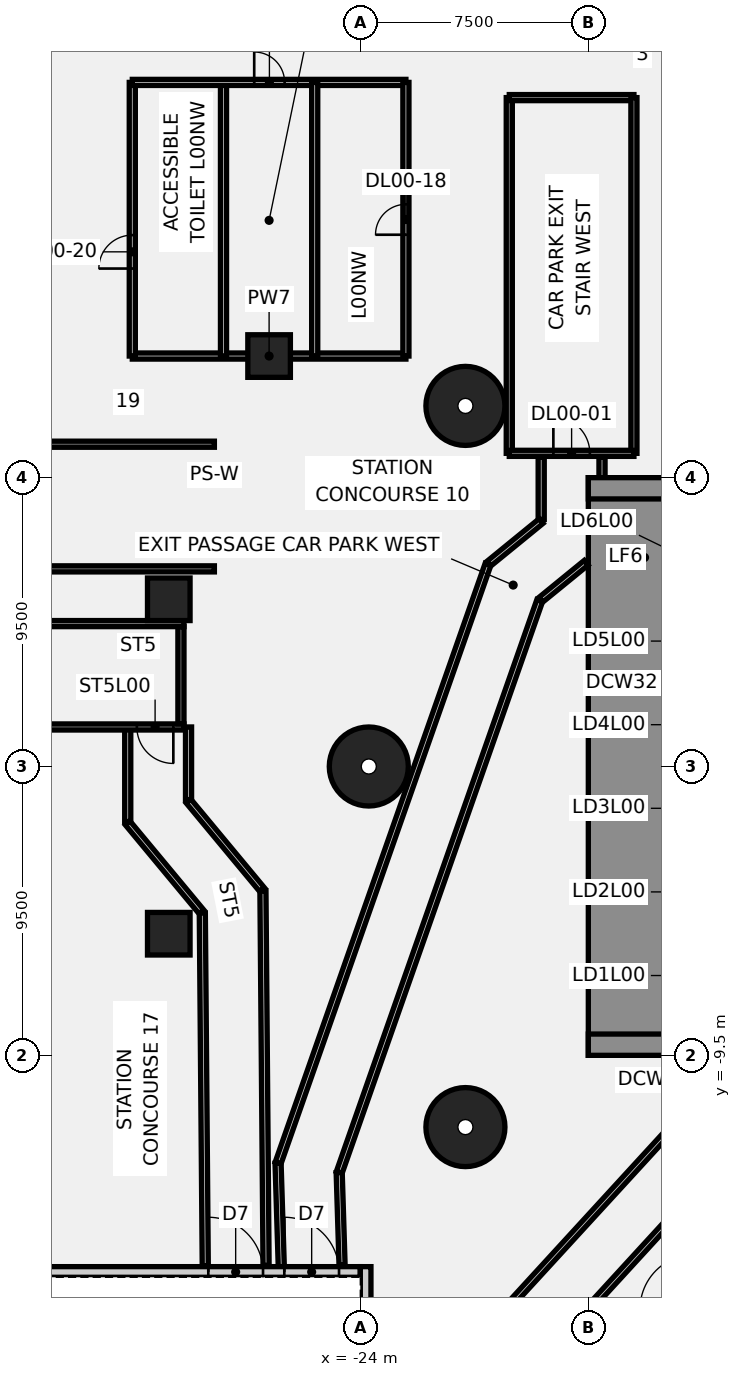
"""IFC4 building model, lengths in metres.
Left out: names, types, materials, properties, quantities, classifications, styles, units other than length and angle.
Written with IfcOpenShell. Run it as: python <this file> out.ifc"""

import sys

from ifc_helpers import new_model, si_unit, direction, frame, frame_2d, origin, origin_2d, place, context, subcontext, project, spatial, polyline, rectangle, circle, outline, extrude, element, fill, save


model = new_model("IFC4")
c1 = context("Model", 3, precision=1e-05, world=origin(), true_north=direction((0.0, 1.0)))
c2 = subcontext(c1, "Body", "Model", "MODEL_VIEW")
j1 = project(units=[si_unit("LENGTHUNIT", "METRE"), si_unit("PLANEANGLEUNIT", "RADIAN")], contexts=[c1])
p1 = place(None, origin())
s1 = spatial("IfcSite", under=j1, at=p1, CompositionType="ELEMENT")
p2 = place(p1, origin())
s2 = spatial("IfcBuilding", under=s1, at=p2, CompositionType="ELEMENT")
p3 = place(p2, origin())
s3 = spatial("IfcBuildingStorey", under=s2, at=p3, CompositionType="ELEMENT", Elevation=0.0)
for number, where, z_axis, x_axis in (
    (1, (-20.543, 11.86, -0.55), (0.0, 0.0, 1.0), (1.0, 0.0, 0.0)),
    (2, (-23.721, 0.0, -0.55), (0.0, 0.0, 1.0), (1.0, 0.0, 0.0)),
    (3, (-20.543, -11.86, -0.55), (0.0, 0.0, 1.0), (1.0, 0.0, 0.0)),
):
    element("IfcColumn", number, at=place(p3, frame(where, z_axis=z_axis, x_axis=x_axis)), inside=s3, PredefinedType="COLUMN", context=c2, shape_type="SweptSolid", body=[
        extrude(circle(Radius=1.3, at=origin_2d()), origin(), (0.0, 0.0, 1.0), 9.05),
    ])
for number, where, z_axis, x_axis in (
    (4, (-30.3, -5.5, -0.55), (0.0, 0.0, 1.0), (1.0, 0.0, 0.0)),
    (5, (-30.3, 5.5, -0.55), (0.0, 0.0, 1.0), (1.0, 0.0, 0.0)),
    (6, (-27.0, 13.5, -0.55), (0.0, 0.0, 1.0), (1.0, 0.0, 0.0)),
):
    element("IfcColumn", number, at=place(p3, frame(where, z_axis=z_axis, x_axis=x_axis)), inside=s3, PredefinedType="COLUMN", context=c2, shape_type="SweptSolid", body=[
        extrude(rectangle(XDim=1.4, YDim=1.4, at=origin_2d()), origin(), (0.0, 0.0, 1.0), 9.05),
    ])
p4 = place(p3, frame((-19.1, 10.3, 0.0), z_axis=(0.0, 0.0, 1.0), x_axis=(0.0, 1.0, 0.0)))
e7 = element("IfcWall", 7, at=p4, inside=s3, PredefinedType="PARTITIONING", context=c2, shape_type="SweptSolid", body=[
    extrude(rectangle(XDim=11.7, YDim=0.2, at=frame_2d((5.85, 0.0))), origin(), (0.0, 0.0, 1.0), 8.5),
])
p5 = place(p3, frame((-19.1, 22.0, 0.0), z_axis=(0.0, 0.0, 1.0), x_axis=(1.0, 0.0, 0.0)))
e8 = element("IfcWall", 8, at=p5, inside=s3, PredefinedType="PARTITIONING", context=c2, shape_type="SweptSolid", body=[
    extrude(rectangle(XDim=4.1, YDim=0.2, at=frame_2d((2.05, 0.0))), origin(), (0.0, 0.0, 1.0), 8.5),
])
p6 = place(p3, frame((-15.0, 10.3, 0.0), z_axis=(0.0, 0.0, 1.0), x_axis=(0.0, 1.0, 0.0)))
e9 = element("IfcWall", 9, at=p6, inside=s3, PredefinedType="PARTITIONING", context=c2, shape_type="SweptSolid", body=[
    extrude(rectangle(XDim=11.7, YDim=0.2, at=frame_2d((5.85, 0.0))), origin(), (0.0, 0.0, 1.0), 8.5),
])
p7 = place(p3, frame((-19.1, 10.3, 0.0), z_axis=(0.0, 0.0, 1.0), x_axis=(1.0, 0.0, 0.0)))
e10 = element("IfcWall", 10, at=p7, inside=s3, PredefinedType="PARTITIONING", context=c2, shape_type="SweptSolid", body=[
    extrude(rectangle(XDim=4.1, YDim=0.2, at=frame_2d((2.05, 0.0))), origin(), (0.0, 0.0, 1.0), 8.5),
])
p8 = place(p7, frame((1.45, 0.0, 0.0)))
e11 = element("IfcOpeningElement", 11, at=p8, cuts=e10, PredefinedType="OPENING", context=c2, shape_type="SweptSolid", body=[
    extrude(rectangle(XDim=1.2, YDim=2.1, at=frame_2d((0.6, 1.05))), frame((0.0, 0.11, 0.0), z_axis=(0.0, -1.0, 0.0), x_axis=(1.0, 0.0, 0.0)), (0.0, 0.0, 1.0), 0.22),
])
for number, where, z_axis, x_axis in (
    (12, (-31.5, 13.5, 0.0), (0.0, 0.0, 1.0), (1.0, 0.0, 0.0)),
    (13, (-28.5, 13.5, 0.0), (0.0, 0.0, 1.0), (0.0, 1.0, 0.0)),
):
    element("IfcWall", number, at=place(p3, frame(where, z_axis=z_axis, x_axis=x_axis)), inside=s3, PredefinedType="PARTITIONING", context=c2, shape_type="SweptSolid", body=[
        extrude(rectangle(XDim=9.0, YDim=0.2, at=frame_2d((4.5, 0.0))), origin(), (0.0, 0.0, 1.0), 8.5),
    ])
p9 = place(p3, frame((-31.5, 13.5, 0.0), z_axis=(0.0, 0.0, 1.0), x_axis=(0.0, 1.0, 0.0)))
e14 = element("IfcWall", 14, at=p9, inside=s3, PredefinedType="PARTITIONING", context=c2, shape_type="SweptSolid", body=[
    extrude(rectangle(XDim=9.0, YDim=0.2, at=frame_2d((4.5, 0.0))), origin(), (0.0, 0.0, 1.0), 8.5),
])
p10 = place(p9, frame((2.877, 0.0, 0.0)))
e15 = element("IfcOpeningElement", 15, at=p10, cuts=e14, PredefinedType="OPENING", context=c2, shape_type="SweptSolid", body=[
    extrude(rectangle(XDim=1.1, YDim=2.1, at=frame_2d((0.55, 1.05))), frame((0.0, 0.11, 0.0), z_axis=(0.0, -1.0, 0.0), x_axis=(1.0, 0.0, 0.0)), (0.0, 0.0, 1.0), 0.22),
])
p11 = place(p3, frame((-31.5, 22.5, 0.0), z_axis=(0.0, 0.0, 1.0), x_axis=(1.0, 0.0, 0.0)))
e16 = element("IfcWall", 16, at=p11, inside=s3, PredefinedType="PARTITIONING", context=c2, shape_type="SweptSolid", body=[
    extrude(rectangle(XDim=9.0, YDim=0.2, at=frame_2d((4.5, 0.0))), origin(), (0.0, 0.0, 1.0), 8.5),
])
p12 = place(p11, frame((4.01, 0.0, 0.0)))
e17 = element("IfcOpeningElement", 17, at=p12, cuts=e16, PredefinedType="OPENING", context=c2, shape_type="SweptSolid", body=[
    extrude(rectangle(XDim=1.0, YDim=2.1, at=frame_2d((0.5, 1.05))), frame((0.0, 0.11, 0.0), z_axis=(0.0, -1.0, 0.0), x_axis=(1.0, 0.0, 0.0)), (0.0, 0.0, 1.0), 0.22),
])
p13 = place(p3, frame((-22.5, 13.5, 0.0), z_axis=(0.0, 0.0, 1.0), x_axis=(0.0, 1.0, 0.0)))
e18 = element("IfcWall", 18, at=p13, inside=s3, PredefinedType="PARTITIONING", context=c2, shape_type="SweptSolid", body=[
    extrude(rectangle(XDim=9.0, YDim=0.2, at=frame_2d((4.5, 0.0))), origin(), (0.0, 0.0, 1.0), 8.5),
])
p14 = place(p13, frame((3.99, 0.0, 0.0)))
e19 = element("IfcOpeningElement", 19, at=p14, cuts=e18, PredefinedType="OPENING", context=c2, shape_type="SweptSolid", body=[
    extrude(rectangle(XDim=1.0, YDim=2.1, at=frame_2d((0.5, 1.05))), frame((0.0, 0.11, 0.0), z_axis=(0.0, -1.0, 0.0), x_axis=(1.0, 0.0, 0.0)), (0.0, 0.0, 1.0), 0.22),
])
p15 = place(p3, frame((-25.5, 13.5, 0.0), z_axis=(0.0, 0.0, 1.0), x_axis=(0.0, 1.0, 0.0)))
e20 = element("IfcWall", 20, at=p15, inside=s3, PredefinedType="PARTITIONING", context=c2, shape_type="SweptSolid", body=[
    extrude(rectangle(XDim=9.0, YDim=0.2, at=frame_2d((4.5, 0.0))), origin(), (0.0, 0.0, 1.0), 8.5),
])
p16 = place(p3, frame((-29.65, 1.3, 0.0), z_axis=(0.0, 0.0, 1.0), x_axis=(0.0, -1.0, 0.0)))
e21 = element("IfcWall", 21, at=p16, inside=s3, PredefinedType="PARTITIONING", context=c2, shape_type="SweptSolid", body=[
    extrude(rectangle(XDim=2.389, YDim=0.2, at=frame_2d((1.194, 0.0))), origin(), (0.0, 0.0, 1.0), 8.5),
])
p17 = place(p3, frame((-29.65, -1.139, 0.0), z_axis=(0.0, 0.0, 1.0), x_axis=(0.638893876697, -0.769294881251, 0.0)))
e22 = element("IfcWall", 22, at=p17, inside=s3, PredefinedType="PARTITIONING", context=c2, shape_type="SweptSolid", body=[
    extrude(rectangle(XDim=3.78, YDim=0.2, at=frame_2d((1.89, 0.0))), origin(), (0.0, 0.0, 1.0), 8.5),
])
p18 = place(p3, frame((-27.203, -4.085, 0.0), z_axis=(0.0, 0.0, 1.0), x_axis=(0.008338160089, -0.999965236939, 0.0)))
e23 = element("IfcWall", 23, at=p18, inside=s3, PredefinedType="PARTITIONING", context=c2, shape_type="SweptSolid", body=[
    extrude(rectangle(XDim=12.327, YDim=0.2, at=frame_2d((6.164, 0.0))), origin(), (0.0, 0.0, 1.0), 8.5),
])
p19 = place(p3, frame((-31.65, 1.3, 0.0), z_axis=(0.0, 0.0, 1.0), x_axis=(0.0, -1.0, 0.0)))
e24 = element("IfcWall", 24, at=p19, inside=s3, PredefinedType="PARTITIONING", context=c2, shape_type="SweptSolid", body=[
    extrude(rectangle(XDim=3.111, YDim=0.2, at=frame_2d((1.556, 0.0))), origin(), (0.0, 0.0, 1.0), 8.5),
])
p20 = place(p3, frame((-31.65, -1.861, 0.0), z_axis=(0.0, 0.0, 1.0), x_axis=(0.638890662578, -0.769297550543, 0.0)))
e25 = element("IfcWall", 25, at=p20, inside=s3, PredefinedType="PARTITIONING", context=c2, shape_type="SweptSolid", body=[
    extrude(rectangle(XDim=3.789, YDim=0.2, at=frame_2d((1.895, 0.0))), origin(), (0.0, 0.0, 1.0), 8.5),
])
p21 = place(p3, frame((-29.197, -4.815, 0.0), z_axis=(0.0, 0.0, 1.0), x_axis=(0.008345305348, -0.999965177333, 0.0)))
e26 = element("IfcWall", 26, at=p21, inside=s3, PredefinedType="PARTITIONING", context=c2, shape_type="SweptSolid", body=[
    extrude(rectangle(XDim=11.614, YDim=0.2, at=frame_2d((5.807, 0.0))), origin(), (0.0, 0.0, 1.0), 8.5),
])
p22 = place(p3, frame((-12.01, -12.95, 0.0), z_axis=(0.0, 0.0, 1.0), x_axis=(-0.675727545108, -0.737151466648, 0.0)))
e27 = element("IfcWall", 27, at=p22, inside=s3, PredefinedType="PARTITIONING", context=c2, shape_type="SweptSolid", body=[
    extrude(rectangle(XDim=11.372, YDim=0.2, at=frame_2d((5.686, 0.0))), origin(), (0.0, 0.0, 1.0), 8.5),
])
p23 = place(p3, frame((-12.89, -10.95, 0.0), z_axis=(0.0, 0.0, 1.0), x_axis=(-0.675720358886, -0.737158054007, 0.0)))
e28 = element("IfcWall", 28, at=p23, inside=s3, PredefinedType="PARTITIONING", context=c2, shape_type="SweptSolid", body=[
    extrude(rectangle(XDim=12.947, YDim=0.2, at=frame_2d((6.473, 0.0))), origin(), (0.0, 0.0, 1.0), 8.5),
])
p24 = place(p3, frame((-16.05, 10.18, 0.0), z_axis=(0.0, 0.0, 1.0), x_axis=(0.0, -1.0, 0.0)))
e29 = element("IfcWall", 29, at=p24, inside=s3, PredefinedType="PARTITIONING", context=c2, shape_type="SweptSolid", body=[
    extrude(rectangle(XDim=0.68, YDim=0.2, at=frame_2d((0.34, 0.0))), origin(), (0.0, 0.0, 1.0), 8.5),
])
p25 = place(p3, frame((-16.57, 6.701, 0.0), z_axis=(0.0, 0.0, 1.0), x_axis=(-0.774917348383, -0.632062578527, 0.0)))
e30 = element("IfcWall", 30, at=p25, inside=s3, PredefinedType="PARTITIONING", context=c2, shape_type="SweptSolid", body=[
    extrude(rectangle(XDim=1.924, YDim=0.2, at=frame_2d((0.962, 0.0))), origin(), (0.0, 0.0, 1.0), 8.5),
])
p26 = place(p3, frame((-18.1, 5.453, 0.0), z_axis=(0.0, 0.0, 1.0), x_axis=(-0.33089272618, -0.943668375946, 0.0)))
e31 = element("IfcWall", 31, at=p26, inside=s3, PredefinedType="PARTITIONING", context=c2, shape_type="SweptSolid", body=[
    extrude(rectangle(XDim=19.931, YDim=0.2, at=frame_2d((9.965, 0.0))), origin(), (0.0, 0.0, 1.0), 8.5),
])
p27 = place(p3, frame((-24.695, -13.355, 0.0), z_axis=(0.0, 0.0, 1.0), x_axis=(0.030966071292, -0.999520436224, 0.0)))
e32 = element("IfcWall", 32, at=p27, inside=s3, PredefinedType="PARTITIONING", context=c2, shape_type="SweptSolid", body=[
    extrude(rectangle(XDim=3.035, YDim=0.2, at=frame_2d((1.518, 0.0))), origin(), (0.0, 0.0, 1.0), 8.5),
])
p28 = place(p3, frame((-18.05, 10.18, 0.0), z_axis=(0.0, 0.0, 1.0), x_axis=(0.0, -1.0, 0.0)))
e33 = element("IfcWall", 33, at=p28, inside=s3, PredefinedType="PARTITIONING", context=c2, shape_type="SweptSolid", body=[
    extrude(rectangle(XDim=2.055, YDim=0.2, at=frame_2d((1.028, 0.0))), origin(), (0.0, 0.0, 1.0), 8.5),
])
p29 = place(p3, frame((-18.05, 8.075, 0.0), z_axis=(0.0, 0.0, 1.0), x_axis=(-0.774892088392, -0.632093546358, 0.0)))
e34 = element("IfcWall", 34, at=p29, inside=s3, PredefinedType="PARTITIONING", context=c2, shape_type="SweptSolid", body=[
    extrude(rectangle(XDim=2.209, YDim=0.2, at=frame_2d((1.104, 0.0))), origin(), (0.0, 0.0, 1.0), 8.5),
])
p30 = place(p3, frame((-19.8, 6.647, 0.0), z_axis=(0.0, 0.0, 1.0), x_axis=(-0.330903303789, -0.943664666893, 0.0)))
e35 = element("IfcWall", 35, at=p30, inside=s3, PredefinedType="PARTITIONING", context=c2, shape_type="SweptSolid", body=[
    extrude(rectangle(XDim=20.867, YDim=0.2, at=frame_2d((10.434, 0.0))), origin(), (0.0, 0.0, 1.0), 8.5),
])
p31 = place(p3, frame((-26.705, -13.045, 0.0), z_axis=(0.0, 0.0, 1.0), x_axis=(0.031031151855, -0.999518417847, 0.0)))
e36 = element("IfcWall", 36, at=p31, inside=s3, PredefinedType="PARTITIONING", context=c2, shape_type="SweptSolid", body=[
    extrude(rectangle(XDim=3.407, YDim=0.2, at=frame_2d((1.703, 0.0))), origin(), (0.0, 0.0, 1.0), 8.5),
])
for number, where, z_axis, x_axis in (
    (37, (-28.8, 10.6, 0.0), (0.0, 0.0, 1.0), (-1.0, 0.0, 0.0)),
    (38, (-28.8, 6.5, 0.0), (0.0, 0.0, 1.0), (-1.0, 0.0, 0.0)),
):
    element("IfcWall", number, at=place(p3, frame(where, z_axis=z_axis, x_axis=x_axis)), inside=s3, PredefinedType="SOLIDWALL", context=c2, shape_type="SweptSolid", body=[
        extrude(rectangle(XDim=9.7, YDim=0.2, at=frame_2d((4.85, 0.0))), origin(), (0.0, 0.0, 1.0), 8.5),
    ])
p32 = place(p3, frame((-42.0, -16.625, 0.0), z_axis=(0.0, 0.0, 1.0), x_axis=(1.0, 0.0, 0.0)))
e39 = element("IfcWall", 39, at=p32, inside=s3, PredefinedType="SOLIDWALL", context=c2, shape_type="SweptSolid", body=[
    extrude(rectangle(XDim=18.0, YDim=0.35, at=frame_2d((9.0, 0.0))), origin(), (0.0, 0.0, 1.0), 8.5),
])
p33 = place(p32, frame((13.0, 0.0, 0.0)))
e40 = element("IfcOpeningElement", 40, at=p33, cuts=e39, PredefinedType="OPENING", context=c2, shape_type="SweptSolid", body=[
    extrude(rectangle(XDim=1.8, YDim=2.4, at=frame_2d((0.9, 1.2))), frame((0.0, 0.185, 0.0), z_axis=(0.0, -1.0, 0.0), x_axis=(1.0, 0.0, 0.0)), (0.0, 0.0, 1.0), 0.37),
])
p34 = place(p32, frame((15.5, 0.0, 0.0)))
e41 = element("IfcOpeningElement", 41, at=p34, cuts=e39, PredefinedType="OPENING", context=c2, shape_type="SweptSolid", body=[
    extrude(rectangle(XDim=1.8, YDim=2.4, at=frame_2d((0.9, 1.2))), frame((0.0, 0.185, 0.0), z_axis=(0.0, -1.0, 0.0), x_axis=(1.0, 0.0, 0.0)), (0.0, 0.0, 1.0), 0.37),
])
p35 = place(p32, frame((4.05, 0.0, 1.0)))
e42 = element("IfcOpeningElement", 42, at=p35, cuts=e39, PredefinedType="OPENING", context=c2, shape_type="SweptSolid", body=[
    extrude(rectangle(XDim=2.4, YDim=1.8, at=frame_2d((1.2, 0.9))), frame((0.0, 0.185, 0.0), z_axis=(0.0, -1.0, 0.0), x_axis=(1.0, 0.0, 0.0)), (0.0, 0.0, 1.0), 0.37),
])
p36 = place(p3, frame((-23.825, -43.85, 0.0), z_axis=(0.0, 0.0, 1.0), x_axis=(0.0, 1.0, 0.0)))
e43 = element("IfcWall", 43, at=p36, inside=s3, PredefinedType="SOLIDWALL", context=c2, shape_type="SweptSolid", body=[
    extrude(rectangle(XDim=27.4, YDim=0.35, at=frame_2d((13.7, 0.0))), origin(), (0.0, 0.0, 1.0), 8.5),
])
p37 = place(p36, frame((20.35, 0.0, 0.0)))
e44 = element("IfcOpeningElement", 44, at=p37, cuts=e43, PredefinedType="OPENING", context=c2, shape_type="SweptSolid", body=[
    extrude(rectangle(XDim=1.8, YDim=2.4, at=frame_2d((0.9, 1.2))), frame((0.0, 0.185, 0.0), z_axis=(0.0, -1.0, 0.0), x_axis=(1.0, 0.0, 0.0)), (0.0, 0.0, 1.0), 0.37),
])
p38 = place(p36, frame((4.85, 0.0, 0.0)))
e45 = element("IfcOpeningElement", 45, at=p38, cuts=e43, PredefinedType="OPENING", context=c2, shape_type="SweptSolid", body=[
    extrude(rectangle(XDim=1.8, YDim=2.4, at=frame_2d((0.9, 1.2))), frame((0.0, 0.185, 0.0), z_axis=(0.0, -1.0, 0.0), x_axis=(1.0, 0.0, 0.0)), (0.0, 0.0, 1.0), 0.37),
])
p39 = place(p36, frame((14.9, 0.0, 1.0)))
e46 = element("IfcOpeningElement", 46, at=p39, cuts=e43, PredefinedType="OPENING", context=c2, shape_type="SweptSolid", body=[
    extrude(rectangle(XDim=2.4, YDim=1.8, at=frame_2d((1.2, 0.9))), frame((0.0, 0.185, 0.0), z_axis=(0.0, -1.0, 0.0), x_axis=(1.0, 0.0, 0.0)), (0.0, 0.0, 1.0), 0.37),
])
p40 = place(p3, frame((-16.5, -9.15, 0.0), z_axis=(0.0, 0.0, 1.0), x_axis=(1.0, 0.0, 0.0)))
e47 = element("IfcWall", 47, at=p40, inside=s3, PredefinedType="SHEAR", context=c2, shape_type="SweptSolid", body=[
    extrude(rectangle(XDim=13.0, YDim=0.7, at=frame_2d((6.5, 0.0))), origin(), (0.0, 0.0, 1.0), 8.5),
])
p41 = place(p40, frame((4.15, 0.0, 0.0)))
e48 = element("IfcOpeningElement", 48, at=p41, cuts=e47, PredefinedType="OPENING", context=c2, shape_type="SweptSolid", body=[
    extrude(rectangle(XDim=1.4, YDim=2.1, at=frame_2d((0.7, 1.05))), frame((0.0, 0.36, 0.0), z_axis=(0.0, -1.0, 0.0), x_axis=(1.0, 0.0, 0.0)), (0.0, 0.0, 1.0), 0.72),
])
p42 = place(p40, frame((10.125, 0.0, 0.0)))
e49 = element("IfcOpeningElement", 49, at=p42, cuts=e47, PredefinedType="OPENING", context=c2, shape_type="SweptSolid", body=[
    extrude(rectangle(XDim=1.4, YDim=2.1, at=frame_2d((0.7, 1.05))), frame((0.0, 0.36, 0.0), z_axis=(0.0, -1.0, 0.0), x_axis=(1.0, 0.0, 0.0)), (0.0, 0.0, 1.0), 0.72),
])
p43 = place(p3, frame((-16.5, 9.15, 0.0), z_axis=(0.0, 0.0, 1.0), x_axis=(1.0, 0.0, 0.0)))
e50 = element("IfcWall", 50, at=p43, inside=s3, PredefinedType="SHEAR", context=c2, shape_type="SweptSolid", body=[
    extrude(rectangle(XDim=13.0, YDim=0.7, at=frame_2d((6.5, 0.0))), origin(), (0.0, 0.0, 1.0), 8.5),
])
p44 = place(p43, frame((4.15, 0.0, 0.0)))
e51 = element("IfcOpeningElement", 51, at=p44, cuts=e50, PredefinedType="OPENING", context=c2, shape_type="SweptSolid", body=[
    extrude(rectangle(XDim=1.4, YDim=2.1, at=frame_2d((0.7, 1.05))), frame((0.0, 0.36, 0.0), z_axis=(0.0, -1.0, 0.0), x_axis=(1.0, 0.0, 0.0)), (0.0, 0.0, 1.0), 0.72),
])
p45 = place(p3, origin())
e52 = element("IfcWall", 52, at=p45, inside=s3, PredefinedType="SHEAR", context=c2, shape_type="SweptSolid", body=[
    extrude(outline(polyline([(-13.5, -8.8), (-13.5, -8.125), (-15.8, -8.125), (-15.8, -5.625), (-13.5, -5.625), (-13.5, -5.375), (-15.8, -5.375), (-15.8, -2.875), (-13.5, -2.875), (-13.5, -2.625), (-15.8, -2.625), (-15.8, -0.125), (-13.5, -0.125), (-13.5, 0.125), (-15.8, 0.125), (-15.8, 2.625), (-13.5, 2.625), (-13.5, 2.875), (-15.8, 2.875), (-15.8, 5.375), (-13.5, 5.375), (-13.5, 5.625), (-15.8, 5.625), (-15.8, 8.125), (-13.5, 8.125), (-13.5, 8.8), (-15.8, 8.8), (-16.5, 8.8), (-16.5, -8.8), (-15.8, -8.8), (-13.5, -8.8)])), origin(), (0.0, 0.0, 1.0), 8.5),
])
p46 = place(p3, frame((-29.8, 1.3, 0.0), z_axis=(0.0, 0.0, 1.0), x_axis=(-1.0, 0.0, 0.0)))
e53 = element("IfcWall", 53, at=p46, inside=s3, PredefinedType="SHEAR", context=c2, shape_type="SweptSolid", body=[
    extrude(rectangle(XDim=6.7, YDim=0.2, at=frame_2d((3.35, 0.0))), origin(), (0.0, 0.0, 1.0), 8.5),
])
p47 = place(p46, frame((0.35, 0.0, 0.0)))
e54 = element("IfcOpeningElement", 54, at=p47, cuts=e53, PredefinedType="OPENING", context=c2, shape_type="SweptSolid", body=[
    extrude(rectangle(XDim=1.2, YDim=2.1, at=frame_2d((0.6, 1.05))), frame((0.0, 0.11, 0.0), z_axis=(0.0, -1.0, 0.0), x_axis=(1.0, 0.0, 0.0)), (0.0, 0.0, 1.0), 0.22),
])
p48 = place(p3, frame((-29.8, 4.7, 0.0), z_axis=(0.0, 0.0, 1.0), x_axis=(-1.0, 0.0, 0.0)))
e55 = element("IfcWall", 55, at=p48, inside=s3, PredefinedType="SHEAR", context=c2, shape_type="SweptSolid", body=[
    extrude(rectangle(XDim=6.7, YDim=0.2, at=frame_2d((3.35, 0.0))), origin(), (0.0, 0.0, 1.0), 8.5),
])
p49 = place(p3, frame((-29.9, 4.6, 0.0), z_axis=(0.0, 0.0, 1.0), x_axis=(0.0, -1.0, 0.0)))
e56 = element("IfcWall", 56, at=p49, inside=s3, PredefinedType="SHEAR", context=c2, shape_type="SweptSolid", body=[
    extrude(rectangle(XDim=3.2, YDim=0.2, at=frame_2d((1.6, 0.0))), origin(), (0.0, 0.0, 1.0), 8.5),
])
p50 = place(p8, origin())
e57 = element("IfcDoor", 57, at=p50, inside=s3, OperationType="SINGLE_SWING_LEFT", PredefinedType="DOOR", context=c2, shape_type="SweptSolid", body=[
    extrude(rectangle(XDim=1.2, YDim=2.1, at=frame_2d((0.6, 1.05))), frame((0.0, 0.025, 0.0), z_axis=(0.0, -1.0, 0.0), x_axis=(1.0, 0.0, 0.0)), (0.0, 0.0, 1.0), 0.05),
])
fill(e11, e57)
p51 = place(p14, origin())
e58 = element("IfcDoor", 58, at=p51, inside=s3, OperationType="SINGLE_SWING_RIGHT", PredefinedType="DOOR", context=c2, shape_type="SweptSolid", body=[
    extrude(rectangle(XDim=1.0, YDim=2.1, at=frame_2d((0.5, 1.05))), frame((0.0, 0.025, 0.0), z_axis=(0.0, -1.0, 0.0), x_axis=(1.0, 0.0, 0.0)), (0.0, 0.0, 1.0), 0.05),
])
fill(e19, e58)
p52 = place(p12, origin())
e59 = element("IfcDoor", 59, at=p52, inside=s3, OperationType="SINGLE_SWING_LEFT", PredefinedType="DOOR", context=c2, shape_type="SweptSolid", body=[
    extrude(rectangle(XDim=1.0, YDim=2.1, at=frame_2d((0.5, 1.05))), frame((0.0, 0.025, 0.0), z_axis=(0.0, -1.0, 0.0), x_axis=(1.0, 0.0, 0.0)), (0.0, 0.0, 1.0), 0.05),
])
fill(e17, e59)
p53 = place(p10, origin())
e60 = element("IfcDoor", 60, at=p53, inside=s3, OperationType="SINGLE_SWING_RIGHT", PredefinedType="DOOR", context=c2, shape_type="SweptSolid", body=[
    extrude(rectangle(XDim=1.1, YDim=2.1, at=frame_2d((0.55, 1.05))), frame((0.0, 0.025, 0.0), z_axis=(0.0, -1.0, 0.0), x_axis=(1.0, 0.0, 0.0)), (0.0, 0.0, 1.0), 0.05),
])
fill(e15, e60)
p54 = place(p33, frame((1.8, 0.0, 0.0), z_axis=(0.0, 0.0, 1.0), x_axis=(-1.0, 0.0, 0.0)))
e61 = element("IfcDoor", 61, at=p54, inside=s3, OperationType="SINGLE_SWING_LEFT", PredefinedType="DOOR", context=c2, shape_type="SweptSolid", body=[
    extrude(rectangle(XDim=1.8, YDim=2.4, at=frame_2d((0.9, 1.2))), frame((0.0, 0.025, 0.0), z_axis=(0.0, -1.0, 0.0), x_axis=(1.0, 0.0, 0.0)), (0.0, 0.0, 1.0), 0.05),
])
fill(e40, e61)
p55 = place(p34, frame((1.8, 0.0, 0.0), z_axis=(0.0, 0.0, 1.0), x_axis=(-1.0, 0.0, 0.0)))
e62 = element("IfcDoor", 62, at=p55, inside=s3, OperationType="SINGLE_SWING_LEFT", PredefinedType="DOOR", context=c2, shape_type="SweptSolid", body=[
    extrude(rectangle(XDim=1.8, YDim=2.4, at=frame_2d((0.9, 1.2))), frame((0.0, 0.025, 0.0), z_axis=(0.0, -1.0, 0.0), x_axis=(1.0, 0.0, 0.0)), (0.0, 0.0, 1.0), 0.05),
])
fill(e41, e62)
p56 = place(p47, origin())
e63 = element("IfcDoor", 63, at=p56, inside=s3, OperationType="SINGLE_SWING_LEFT", PredefinedType="DOOR", context=c2, shape_type="SweptSolid", body=[
    extrude(rectangle(XDim=1.2, YDim=2.1, at=frame_2d((0.6, 1.05))), frame((0.0, 0.025, 0.0), z_axis=(0.0, -1.0, 0.0), x_axis=(1.0, 0.0, 0.0)), (0.0, 0.0, 1.0), 0.05),
])
fill(e54, e63)
save(model, sys.argv[1])
